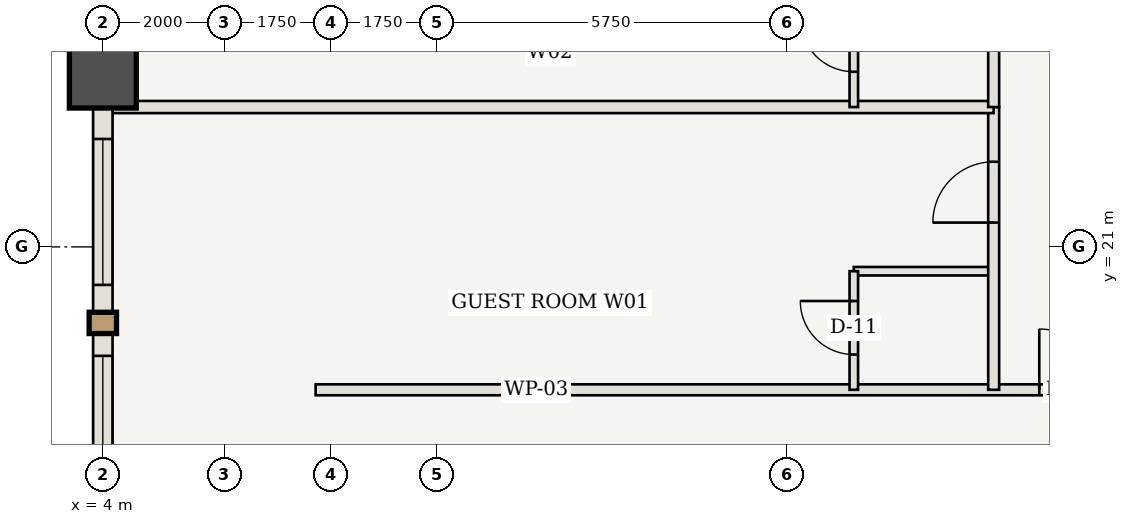
"""IFC4 building model, lengths in metres.
Left out: names, types, materials, properties, quantities, classifications, styles, units other than length and angle.
Written with IfcOpenShell. Run it as: python <this file> out.ifc"""

import sys

from ifc_helpers import new_model, si_unit, direction, frame, frame_2d, origin, origin_2d, place, context, subcontext, project, spatial, rectangle, extrude, element, fill, save


model = new_model("IFC4")
c1 = context("Model", 3, precision=1e-05, world=origin(), true_north=direction((0.0, 1.0)))
c2 = subcontext(c1, "Body", "Model", "MODEL_VIEW")
j1 = project(units=[si_unit("LENGTHUNIT", "METRE"), si_unit("PLANEANGLEUNIT", "RADIAN")], contexts=[c1])
p1 = place(None, origin())
s1 = spatial("IfcSite", under=j1, at=p1, CompositionType="ELEMENT")
p2 = place(p1, origin())
s2 = spatial("IfcBuilding", under=s1, at=p2, CompositionType="ELEMENT")
p3 = place(p2, frame((0.0, 0.0, 63.35)))
s3 = spatial("IfcBuildingStorey", under=s2, at=p3, CompositionType="ELEMENT", Elevation=63.35)
p4 = place(p3, frame((4.0, 23.833, 0.0), z_axis=(0.0, 0.0, 1.0), x_axis=(1.0, 0.0, 0.0)))
e1 = element("IfcColumn", 1, at=p4, inside=s3, PredefinedType="COLUMN", context=c2, shape_type="SweptSolid", body=[
    extrude(rectangle(XDim=1.1, YDim=1.1, at=origin_2d()), origin(), (0.0, 0.0, 1.0), 3.5),
])
p5 = place(p3, frame((7.5, 18.65, 0.0), z_axis=(0.0, 0.0, 1.0), x_axis=(1.0, 0.0, 0.0)))
e2 = element("IfcWall", 2, at=p5, inside=s3, PredefinedType="STANDARD", context=c2, shape_type="SweptSolid", body=[
    extrude(rectangle(XDim=16.5, YDim=0.18, at=frame_2d((8.25, 0.0))), origin(), (0.0, 0.0, 1.0), 3.32),
])
p6 = place(p5, frame((11.9, 0.0, 0.0)))
e3 = element("IfcOpeningElement", 3, at=p6, cuts=e2, PredefinedType="OPENING", context=c2, shape_type="SweptSolid", body=[
    extrude(rectangle(XDim=1.0, YDim=2.15, at=frame_2d((0.5, 1.075))), frame((0.0, 0.1, 0.0), z_axis=(0.0, -1.0, 0.0), x_axis=(1.0, 0.0, 0.0)), (0.0, 0.0, 1.0), 0.2),
])
p7 = place(p3, frame((16.35, 20.6, 0.0), z_axis=(0.0, 0.0, 1.0), x_axis=(1.0, 0.0, 0.0)))
e4 = element("IfcWall", 4, at=p7, inside=s3, PredefinedType="STANDARD", context=c2, shape_type="SweptSolid", body=[
    extrude(rectangle(XDim=2.3, YDim=0.14, at=frame_2d((1.15, 0.0))), origin(), (0.0, 0.0, 1.0), 2.615),
])
p8 = place(p3, frame((16.35, 18.65, 0.0), z_axis=(0.0, 0.0, 1.0), x_axis=(0.0, 1.0, 0.0)))
e5 = element("IfcWall", 5, at=p8, inside=s3, PredefinedType="STANDARD", context=c2, shape_type="SweptSolid", body=[
    extrude(rectangle(XDim=1.95, YDim=0.14, at=frame_2d((0.975, 0.0))), origin(), (0.0, 0.0, 1.0), 3.32),
])
p9 = place(p8, frame((0.58, 0.0, 0.0)))
e6 = element("IfcOpeningElement", 6, at=p9, cuts=e5, PredefinedType="OPENING", context=c2, shape_type="SweptSolid", body=[
    extrude(rectangle(XDim=0.88, YDim=2.1, at=frame_2d((0.44, 1.05))), frame((0.0, 0.08, 0.0), z_axis=(0.0, -1.0, 0.0), x_axis=(1.0, 0.0, 0.0)), (0.0, 0.0, 1.0), 0.16),
])
p10 = place(p3, frame((18.65, 18.65, 0.0), z_axis=(0.0, 0.0, 1.0), x_axis=(0.0, 1.0, 0.0)))
e7 = element("IfcWall", 7, at=p10, inside=s3, PredefinedType="STANDARD", context=c2, shape_type="SweptSolid", body=[
    extrude(rectangle(XDim=4.65, YDim=0.18, at=frame_2d((2.325, 0.0))), origin(), (0.0, 0.0, 1.0), 3.32),
])
p11 = place(p10, frame((2.75, 0.0, 0.0)))
e8 = element("IfcOpeningElement", 8, at=p11, cuts=e7, PredefinedType="OPENING", context=c2, shape_type="SweptSolid", body=[
    extrude(rectangle(XDim=1.0, YDim=2.15, at=frame_2d((0.5, 1.075))), frame((0.0, 0.1, 0.0), z_axis=(0.0, -1.0, 0.0), x_axis=(1.0, 0.0, 0.0)), (0.0, 0.0, 1.0), 0.2),
])
p12 = place(p3, frame((4.06, 23.3, 0.0), z_axis=(0.0, 0.0, 1.0), x_axis=(1.0, 0.0, 0.0)))
e9 = element("IfcWall", 9, at=p12, inside=s3, PredefinedType="STANDARD", context=c2, shape_type="SweptSolid", body=[
    extrude(rectangle(XDim=14.59, YDim=0.2, at=frame_2d((7.295, 0.0))), origin(), (0.0, 0.0, 1.0), 3.32),
])
p13 = place(p3, frame((16.35, 23.3, 0.0), z_axis=(0.0, 0.0, 1.0), x_axis=(0.0, 1.0, 0.0)))
e10 = element("IfcWall", 10, at=p13, inside=s3, PredefinedType="STANDARD", context=c2, shape_type="SweptSolid", body=[
    extrude(rectangle(XDim=1.95, YDim=0.14, at=frame_2d((0.975, 0.0))), origin(), (0.0, 0.0, 1.0), 3.32),
])
p14 = place(p13, frame((0.58, 0.0, 0.0)))
e11 = element("IfcOpeningElement", 11, at=p14, cuts=e10, PredefinedType="OPENING", context=c2, shape_type="SweptSolid", body=[
    extrude(rectangle(XDim=0.88, YDim=2.1, at=frame_2d((0.44, 1.05))), frame((0.0, 0.08, 0.0), z_axis=(0.0, -1.0, 0.0), x_axis=(1.0, 0.0, 0.0)), (0.0, 0.0, 1.0), 0.16),
])
p15 = place(p3, frame((18.65, 23.3, 0.0), z_axis=(0.0, 0.0, 1.0), x_axis=(0.0, 1.0, 0.0)))
e12 = element("IfcWall", 12, at=p15, inside=s3, PredefinedType="STANDARD", context=c2, shape_type="SweptSolid", body=[
    extrude(rectangle(XDim=4.7, YDim=0.18, at=frame_2d((2.35, 0.0))), origin(), (0.0, 0.0, 1.0), 3.32),
])
p16 = place(p15, frame((2.775, 0.0, 0.0)))
e13 = element("IfcOpeningElement", 13, at=p16, cuts=e12, PredefinedType="OPENING", context=c2, shape_type="SweptSolid", body=[
    extrude(rectangle(XDim=1.0, YDim=2.15, at=frame_2d((0.5, 1.075))), frame((0.0, 0.1, 0.0), z_axis=(0.0, -1.0, 0.0), x_axis=(1.0, 0.0, 0.0)), (0.0, 0.0, 1.0), 0.2),
])
p17 = place(p3, frame((4.0, 15.667, 0.0), z_axis=(0.0, 0.0, 1.0), x_axis=(0.0, 1.0, 0.0)))
e14 = element("IfcWall", 14, at=p17, inside=s3, PredefinedType="USERDEFINED", context=c2, shape_type="SweptSolid", body=[
    extrude(rectangle(XDim=8.167, YDim=0.32, at=frame_2d((4.083, 0.0))), origin(), (0.0, 0.0, 1.0), 2.52),
])
p18 = place(p17, frame((0.742, 0.0, 0.85)))
e15 = element("IfcOpeningElement", 15, at=p18, cuts=e14, PredefinedType="OPENING", context=c2, shape_type="SweptSolid", body=[
    extrude(rectangle(XDim=2.8, YDim=1.47, at=frame_2d((1.4, 0.735))), frame((0.0, 0.17, 0.0), z_axis=(0.0, -1.0, 0.0), x_axis=(1.0, 0.0, 0.0)), (0.0, 0.0, 1.0), 0.34),
])
p19 = place(p17, frame((4.708, 0.0, 0.85)))
e16 = element("IfcOpeningElement", 16, at=p19, cuts=e14, PredefinedType="OPENING", context=c2, shape_type="SweptSolid", body=[
    extrude(rectangle(XDim=2.4, YDim=1.47, at=frame_2d((1.2, 0.735))), frame((0.0, 0.17, 0.0), z_axis=(0.0, -1.0, 0.0), x_axis=(1.0, 0.0, 0.0)), (0.0, 0.0, 1.0), 0.34),
])
p20 = place(p3, frame((4.0, 23.833, 0.0), z_axis=(0.0, 0.0, 1.0), x_axis=(0.0, 1.0, 0.0)))
e17 = element("IfcWall", 17, at=p20, inside=s3, PredefinedType="USERDEFINED", context=c2, shape_type="SweptSolid", body=[
    extrude(rectangle(XDim=8.167, YDim=0.32, at=frame_2d((4.083, 0.0))), origin(), (0.0, 0.0, 1.0), 2.52),
])
p21 = place(p20, frame((1.033, 0.0, 0.85)))
e18 = element("IfcOpeningElement", 18, at=p21, cuts=e17, PredefinedType="OPENING", context=c2, shape_type="SweptSolid", body=[
    extrude(rectangle(XDim=2.4, YDim=1.47, at=frame_2d((1.2, 0.735))), frame((0.0, 0.17, 0.0), z_axis=(0.0, -1.0, 0.0), x_axis=(1.0, 0.0, 0.0)), (0.0, 0.0, 1.0), 0.34),
])
p22 = place(p20, frame((4.817, 0.0, 0.85)))
e19 = element("IfcOpeningElement", 19, at=p22, cuts=e17, PredefinedType="OPENING", context=c2, shape_type="SweptSolid", body=[
    extrude(rectangle(XDim=2.4, YDim=1.47, at=frame_2d((1.2, 0.735))), frame((0.0, 0.17, 0.0), z_axis=(0.0, -1.0, 0.0), x_axis=(1.0, 0.0, 0.0)), (0.0, 0.0, 1.0), 0.34),
])
p23 = place(p6, origin())
e20 = element("IfcDoor", 20, at=p23, inside=s3, OperationType="SINGLE_SWING_LEFT", PredefinedType="DOOR", context=c2, shape_type="SweptSolid", body=[
    extrude(rectangle(XDim=1.0, YDim=2.15, at=frame_2d((0.5, 1.075))), frame((0.0, 0.025, 0.0), z_axis=(0.0, -1.0, 0.0), x_axis=(1.0, 0.0, 0.0)), (0.0, 0.0, 1.0), 0.05),
])
fill(e3, e20)
p24 = place(p9, origin())
e21 = element("IfcDoor", 21, at=p24, inside=s3, OperationType="SINGLE_SWING_RIGHT", PredefinedType="DOOR", context=c2, shape_type="SweptSolid", body=[
    extrude(rectangle(XDim=0.88, YDim=2.1, at=frame_2d((0.44, 1.05))), frame((0.0, 0.025, 0.0), z_axis=(0.0, -1.0, 0.0), x_axis=(1.0, 0.0, 0.0)), (0.0, 0.0, 1.0), 0.05),
])
fill(e6, e21)
p25 = place(p11, origin())
e22 = element("IfcDoor", 22, at=p25, inside=s3, OperationType="SINGLE_SWING_LEFT", PredefinedType="DOOR", context=c2, shape_type="SweptSolid", body=[
    extrude(rectangle(XDim=1.0, YDim=2.15, at=frame_2d((0.5, 1.075))), frame((0.0, 0.025, 0.0), z_axis=(0.0, -1.0, 0.0), x_axis=(1.0, 0.0, 0.0)), (0.0, 0.0, 1.0), 0.05),
])
fill(e8, e22)
p26 = place(p14, origin())
e23 = element("IfcDoor", 23, at=p26, inside=s3, OperationType="SINGLE_SWING_RIGHT", PredefinedType="DOOR", context=c2, shape_type="SweptSolid", body=[
    extrude(rectangle(XDim=0.88, YDim=2.1, at=frame_2d((0.44, 1.05))), frame((0.0, 0.025, 0.0), z_axis=(0.0, -1.0, 0.0), x_axis=(1.0, 0.0, 0.0)), (0.0, 0.0, 1.0), 0.05),
])
fill(e11, e23)
p27 = place(p18, origin())
e24 = element("IfcWindow", 24, at=p27, inside=s3, PartitioningType="SINGLE_PANEL", PredefinedType="WINDOW", context=c2, shape_type="SweptSolid", body=[
    extrude(rectangle(XDim=2.8, YDim=1.47, at=frame_2d((1.4, 0.735))), frame((0.0, 0.03, 0.0), z_axis=(0.0, -1.0, 0.0), x_axis=(1.0, 0.0, 0.0)), (0.0, 0.0, 1.0), 0.06),
])
fill(e15, e24)
p28 = place(p19, origin())
e25 = element("IfcWindow", 25, at=p28, inside=s3, PartitioningType="SINGLE_PANEL", PredefinedType="WINDOW", context=c2, shape_type="SweptSolid", body=[
    extrude(rectangle(XDim=2.4, YDim=1.47, at=frame_2d((1.2, 0.735))), frame((0.0, 0.03, 0.0), z_axis=(0.0, -1.0, 0.0), x_axis=(1.0, 0.0, 0.0)), (0.0, 0.0, 1.0), 0.06),
])
fill(e16, e25)
save(model, sys.argv[1])
